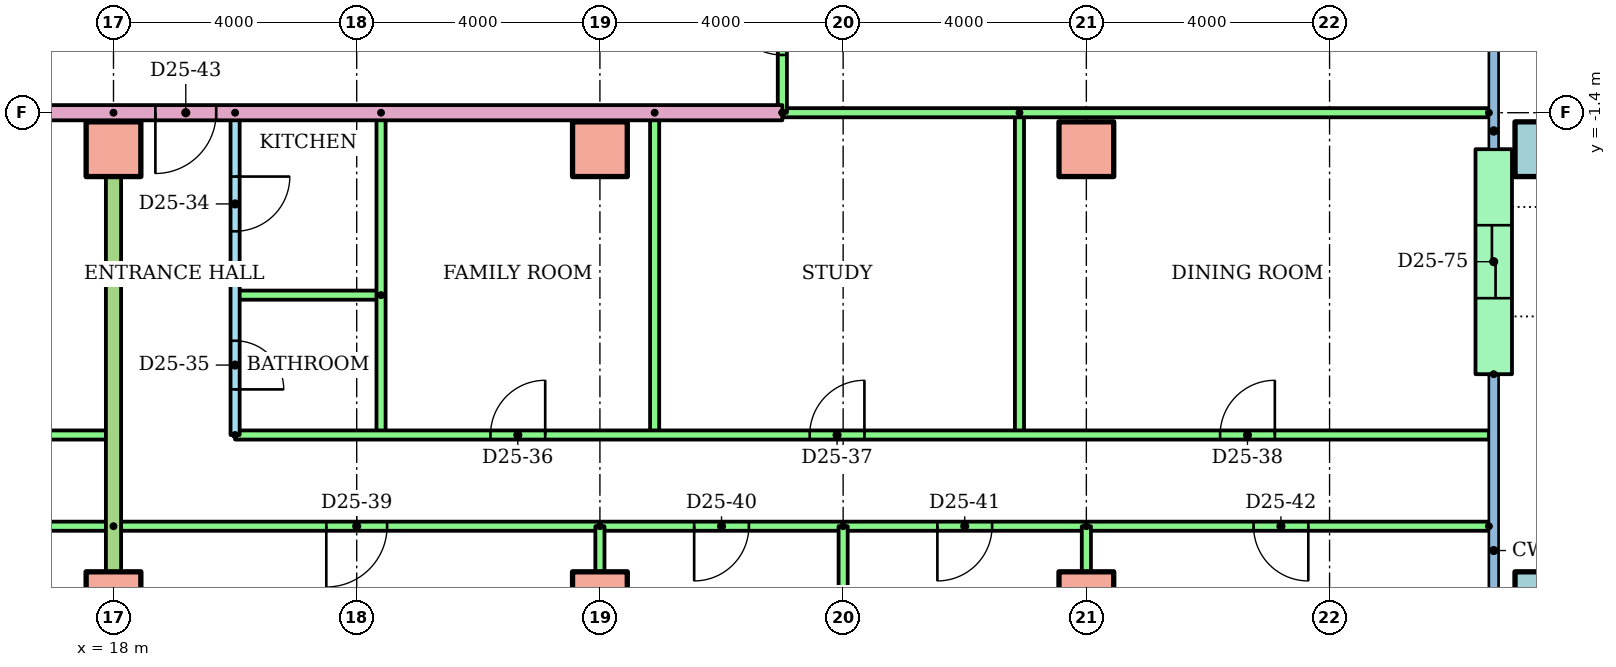
"""IFC4 building model, lengths in metres.
Left out: names, types, materials, properties, quantities, classifications, styles, units other than length and angle.
Written with IfcOpenShell. Run it as: python <this file> out.ifc"""

import sys

from ifc_helpers import new_model, si_unit, direction, frame, frame_2d, origin, origin_2d, place, context, subcontext, project, spatial, rectangle, hollow_rectangle, extrude, element, fill, save


model = new_model("IFC4")
c1 = context("Model", 3, precision=1e-05, world=origin(), true_north=direction((0.0, 1.0)))
c2 = subcontext(c1, "Body", "Model", "MODEL_VIEW")
j1 = project(units=[si_unit("LENGTHUNIT", "METRE"), si_unit("PLANEANGLEUNIT", "RADIAN")], contexts=[c1])
p1 = place(None, origin())
s1 = spatial("IfcSite", under=j1, at=p1, CompositionType="ELEMENT")
p2 = place(p1, origin())
s2 = spatial("IfcBuilding", under=s1, at=p2, CompositionType="ELEMENT")
p3 = place(p2, frame((0.0, 0.0, 96.7)))
s3 = spatial("IfcBuildingStorey", under=s2, at=p3, CompositionType="ELEMENT", Elevation=96.7)
for number, where in (
    (1, (18.0, -9.4, 0.0)),
    (2, (26.0, -9.4, 0.0)),
    (3, (34.0, -9.4, 0.0)),
):
    element("IfcColumn", number, at=place(p3, frame(where)), inside=s3, PredefinedType="COLUMN", context=c2, shape_type="SweptSolid", body=[
        extrude(rectangle(XDim=0.9, YDim=0.9, at=origin_2d()), origin(), (0.0, 0.0, 1.0), 3.2),
    ])
p4 = place(p3, frame((41.5, -9.4, 0.0)))
e4 = element("IfcColumn", 4, at=p4, inside=s3, PredefinedType="COLUMN", context=c2, shape_type="SweptSolid", body=[
    extrude(hollow_rectangle(XDim=0.9, YDim=0.9, WallThickness=0.045, at=origin_2d()), origin(), (0.0, 0.0, 1.0), 3.2),
])
for number, where in (
    (5, (18.0, -2.0, 0.0)),
    (6, (26.0, -2.0, 0.0)),
    (7, (34.0, -2.0, 0.0)),
):
    element("IfcColumn", number, at=place(p3, frame(where)), inside=s3, PredefinedType="COLUMN", context=c2, shape_type="SweptSolid", body=[
        extrude(rectangle(XDim=0.9, YDim=0.9, at=origin_2d()), origin(), (0.0, 0.0, 1.0), 3.2),
    ])
p5 = place(p3, frame((41.5, -2.0, 0.0)))
e8 = element("IfcColumn", 8, at=p5, inside=s3, PredefinedType="COLUMN", context=c2, shape_type="SweptSolid", body=[
    extrude(hollow_rectangle(XDim=0.9, YDim=0.9, WallThickness=0.045, at=origin_2d()), origin(), (0.0, 0.0, 1.0), 3.2),
])
p6 = place(p3, frame((40.7, -5.7, 0.0), z_axis=(0.0, 0.0, 1.0), x_axis=(0.0, 1.0, 0.0)))
e9 = element("IfcWall", 9, at=p6, inside=s3, PredefinedType="STANDARD", context=c2, shape_type="SweptSolid", body=[
    extrude(rectangle(XDim=3.7, YDim=0.6, at=frame_2d((1.85, 0.0))), origin(), (0.0, 0.0, 1.0), 2.92),
])
p7 = place(p6, frame((1.25, 0.0, 0.0)))
e10 = element("IfcOpeningElement", 10, at=p7, cuts=e9, PredefinedType="OPENING", context=c2, shape_type="SweptSolid", body=[
    extrude(rectangle(XDim=1.2, YDim=2.1, at=frame_2d((0.6, 1.05))), frame((0.0, 0.31, 0.0), z_axis=(0.0, -1.0, 0.0), x_axis=(1.0, 0.0, 0.0)), (0.0, 0.0, 1.0), 0.62),
])
p8 = place(p3, frame((-4.0, -6.7, 0.0)))
e11 = element("IfcWall", 11, at=p8, inside=s3, PredefinedType="PARTITIONING", context=c2, shape_type="SweptSolid", body=[
    extrude(rectangle(XDim=22.0, YDim=0.15, at=frame_2d((11.0, 0.0))), origin(), (0.0, 0.0, 1.0), 2.4),
])
p9 = place(p8, frame((6.075, 0.0, 0.0)))
e12 = element("IfcOpeningElement", 12, at=p9, cuts=e11, PredefinedType="OPENING", context=c2, shape_type="SweptSolid", body=[
    extrude(rectangle(XDim=0.9, YDim=2.1, at=frame_2d((0.45, 1.05))), frame((0.0, 0.085, 0.0), z_axis=(0.0, -1.0, 0.0), x_axis=(1.0, 0.0, 0.0)), (0.0, 0.0, 1.0), 0.17),
])
p10 = place(p8, frame((13.45, 0.0, 0.0)))
e13 = element("IfcOpeningElement", 13, at=p10, cuts=e11, PredefinedType="OPENING", context=c2, shape_type="SweptSolid", body=[
    extrude(rectangle(XDim=0.9, YDim=2.1, at=frame_2d((0.45, 1.05))), frame((0.0, 0.085, 0.0), z_axis=(0.0, -1.0, 0.0), x_axis=(1.0, 0.0, 0.0)), (0.0, 0.0, 1.0), 0.17),
])
p11 = place(p8, frame((19.125, 0.0, 0.0)))
e14 = element("IfcOpeningElement", 14, at=p11, cuts=e11, PredefinedType="OPENING", context=c2, shape_type="SweptSolid", body=[
    extrude(rectangle(XDim=0.9, YDim=2.1, at=frame_2d((0.45, 1.05))), frame((0.0, 0.085, 0.0), z_axis=(0.0, -1.0, 0.0), x_axis=(1.0, 0.0, 0.0)), (0.0, 0.0, 1.0), 0.17),
])
p12 = place(p3, frame((18.0, -8.2, 0.0), z_axis=(0.0, 0.0, 1.0), x_axis=(-1.0, 0.0, 0.0)))
e15 = element("IfcWall", 15, at=p12, inside=s3, PredefinedType="PARTITIONING", context=c2, shape_type="SweptSolid", body=[
    extrude(rectangle(XDim=24.0, YDim=0.15, at=frame_2d((12.0, 0.0))), origin(), (0.0, 0.0, 1.0), 2.4),
])
p13 = place(p12, frame((19.5, 0.0, 0.0)))
e16 = element("IfcOpeningElement", 16, at=p13, cuts=e15, PredefinedType="OPENING", context=c2, shape_type="SweptSolid", body=[
    extrude(rectangle(XDim=1.0, YDim=2.1, at=frame_2d((0.5, 1.05))), frame((0.0, 0.085, 0.0), z_axis=(0.0, -1.0, 0.0), x_axis=(1.0, 0.0, 0.0)), (0.0, 0.0, 1.0), 0.17),
])
p14 = place(p12, frame((13.55, 0.0, 0.0)))
e17 = element("IfcOpeningElement", 17, at=p14, cuts=e15, PredefinedType="OPENING", context=c2, shape_type="SweptSolid", body=[
    extrude(rectangle(XDim=0.9, YDim=2.1, at=frame_2d((0.45, 1.05))), frame((0.0, 0.085, 0.0), z_axis=(0.0, -1.0, 0.0), x_axis=(1.0, 0.0, 0.0)), (0.0, 0.0, 1.0), 0.17),
])
p15 = place(p12, frame((9.55, 0.0, 0.0)))
e18 = element("IfcOpeningElement", 18, at=p15, cuts=e15, PredefinedType="OPENING", context=c2, shape_type="SweptSolid", body=[
    extrude(rectangle(XDim=0.9, YDim=2.1, at=frame_2d((0.45, 1.05))), frame((0.0, 0.085, 0.0), z_axis=(0.0, -1.0, 0.0), x_axis=(1.0, 0.0, 0.0)), (0.0, 0.0, 1.0), 0.17),
])
p16 = place(p12, frame((5.55, 0.0, 0.0)))
e19 = element("IfcOpeningElement", 19, at=p16, cuts=e15, PredefinedType="OPENING", context=c2, shape_type="SweptSolid", body=[
    extrude(rectangle(XDim=0.9, YDim=2.1, at=frame_2d((0.45, 1.05))), frame((0.0, 0.085, 0.0), z_axis=(0.0, -1.0, 0.0), x_axis=(1.0, 0.0, 0.0)), (0.0, 0.0, 1.0), 0.17),
])
p17 = place(p12, frame((1.55, 0.0, 0.0)))
e20 = element("IfcOpeningElement", 20, at=p17, cuts=e15, PredefinedType="OPENING", context=c2, shape_type="SweptSolid", body=[
    extrude(rectangle(XDim=0.9, YDim=2.1, at=frame_2d((0.45, 1.05))), frame((0.0, 0.085, 0.0), z_axis=(0.0, -1.0, 0.0), x_axis=(1.0, 0.0, 0.0)), (0.0, 0.0, 1.0), 0.17),
])
p18 = place(p3, frame((20.0, -1.4, 0.0), z_axis=(0.0, 0.0, 1.0), x_axis=(0.0, -1.0, 0.0)))
e21 = element("IfcWall", 21, at=p18, inside=s3, PredefinedType="PARTITIONING", context=c2, shape_type="SweptSolid", body=[
    extrude(rectangle(XDim=5.3, YDim=0.15, at=frame_2d((2.65, 0.0))), origin(), (0.0, 0.0, 1.0), 2.4),
])
p19 = place(p18, frame((1.05, 0.0, 0.0)))
e22 = element("IfcOpeningElement", 22, at=p19, cuts=e21, PredefinedType="OPENING", context=c2, shape_type="SweptSolid", body=[
    extrude(rectangle(XDim=0.9, YDim=2.1, at=frame_2d((0.45, 1.05))), frame((0.0, 0.085, 0.0), z_axis=(0.0, -1.0, 0.0), x_axis=(1.0, 0.0, 0.0)), (0.0, 0.0, 1.0), 0.17),
])
p20 = place(p18, frame((3.75, 0.0, 0.0)))
e23 = element("IfcOpeningElement", 23, at=p20, cuts=e21, PredefinedType="OPENING", context=c2, shape_type="SweptSolid", body=[
    extrude(rectangle(XDim=0.8, YDim=2.1, at=frame_2d((0.4, 1.05))), frame((0.0, 0.085, 0.0), z_axis=(0.0, -1.0, 0.0), x_axis=(1.0, 0.0, 0.0)), (0.0, 0.0, 1.0), 0.17),
])
p21 = place(p3, frame((22.4, -4.4, 0.0), z_axis=(0.0, 0.0, 1.0), x_axis=(-1.0, 0.0, 0.0)))
e24 = element("IfcWall", 24, at=p21, inside=s3, PredefinedType="PARTITIONING", context=c2, shape_type="SweptSolid", body=[
    extrude(rectangle(XDim=2.4, YDim=0.15, at=frame_2d((1.2, 0.0))), origin(), (0.0, 0.0, 1.0), 2.4),
])
for number, where, z_axis, x_axis in (
    (25, (22.4, -1.4, 0.0), (0.0, 0.0, 1.0), (0.0, -1.0, 0.0)),
    (26, (26.9, -1.4, 0.0), (0.0, 0.0, 1.0), (0.0, -1.0, 0.0)),
    (27, (32.9, -1.4, 0.0), (0.0, 0.0, 1.0), (0.0, -1.0, 0.0)),
):
    element("IfcWall", number, at=place(p3, frame(where, z_axis=z_axis, x_axis=x_axis)), inside=s3, PredefinedType="PARTITIONING", context=c2, shape_type="SweptSolid", body=[
        extrude(rectangle(XDim=5.3, YDim=0.15, at=frame_2d((2.65, 0.0))), origin(), (0.0, 0.0, 1.0), 2.4),
    ])
p22 = place(p3, frame((20.0, -6.7, 0.0)))
e28 = element("IfcWall", 28, at=p22, inside=s3, PredefinedType="PARTITIONING", context=c2, shape_type="SweptSolid", body=[
    extrude(rectangle(XDim=20.62, YDim=0.15, at=frame_2d((10.31, 0.0))), origin(), (0.0, 0.0, 1.0), 2.4),
])
p23 = place(p22, frame((4.2, 0.0, 0.0)))
e29 = element("IfcOpeningElement", 29, at=p23, cuts=e28, PredefinedType="OPENING", context=c2, shape_type="SweptSolid", body=[
    extrude(rectangle(XDim=0.9, YDim=2.1, at=frame_2d((0.45, 1.05))), frame((0.0, 0.085, 0.0), z_axis=(0.0, -1.0, 0.0), x_axis=(1.0, 0.0, 0.0)), (0.0, 0.0, 1.0), 0.17),
])
p24 = place(p22, frame((9.45, 0.0, 0.0)))
e30 = element("IfcOpeningElement", 30, at=p24, cuts=e28, PredefinedType="OPENING", context=c2, shape_type="SweptSolid", body=[
    extrude(rectangle(XDim=0.9, YDim=2.1, at=frame_2d((0.45, 1.05))), frame((0.0, 0.085, 0.0), z_axis=(0.0, -1.0, 0.0), x_axis=(1.0, 0.0, 0.0)), (0.0, 0.0, 1.0), 0.17),
])
p25 = place(p22, frame((16.2, 0.0, 0.0)))
e31 = element("IfcOpeningElement", 31, at=p25, cuts=e28, PredefinedType="OPENING", context=c2, shape_type="SweptSolid", body=[
    extrude(rectangle(XDim=0.9, YDim=2.1, at=frame_2d((0.45, 1.05))), frame((0.0, 0.085, 0.0), z_axis=(0.0, -1.0, 0.0), x_axis=(1.0, 0.0, 0.0)), (0.0, 0.0, 1.0), 0.17),
])
p26 = place(p3, frame((40.62, -8.2, 0.0), z_axis=(0.0, 0.0, 1.0), x_axis=(-1.0, 0.0, 0.0)))
e32 = element("IfcWall", 32, at=p26, inside=s3, PredefinedType="PARTITIONING", context=c2, shape_type="SweptSolid", body=[
    extrude(rectangle(XDim=22.62, YDim=0.15, at=frame_2d((11.31, 0.0))), origin(), (0.0, 0.0, 1.0), 2.4),
])
p27 = place(p26, frame((18.12, 0.0, 0.0)))
e33 = element("IfcOpeningElement", 33, at=p27, cuts=e32, PredefinedType="OPENING", context=c2, shape_type="SweptSolid", body=[
    extrude(rectangle(XDim=1.0, YDim=2.1, at=frame_2d((0.5, 1.05))), frame((0.0, 0.085, 0.0), z_axis=(0.0, -1.0, 0.0), x_axis=(1.0, 0.0, 0.0)), (0.0, 0.0, 1.0), 0.17),
])
p28 = place(p26, frame((12.17, 0.0, 0.0)))
e34 = element("IfcOpeningElement", 34, at=p28, cuts=e32, PredefinedType="OPENING", context=c2, shape_type="SweptSolid", body=[
    extrude(rectangle(XDim=0.9, YDim=2.1, at=frame_2d((0.45, 1.05))), frame((0.0, 0.085, 0.0), z_axis=(0.0, -1.0, 0.0), x_axis=(1.0, 0.0, 0.0)), (0.0, 0.0, 1.0), 0.17),
])
p29 = place(p26, frame((8.17, 0.0, 0.0)))
e35 = element("IfcOpeningElement", 35, at=p29, cuts=e32, PredefinedType="OPENING", context=c2, shape_type="SweptSolid", body=[
    extrude(rectangle(XDim=0.9, YDim=2.1, at=frame_2d((0.45, 1.05))), frame((0.0, 0.085, 0.0), z_axis=(0.0, -1.0, 0.0), x_axis=(1.0, 0.0, 0.0)), (0.0, 0.0, 1.0), 0.17),
])
p30 = place(p26, frame((2.97, 0.0, 0.0)))
e36 = element("IfcOpeningElement", 36, at=p30, cuts=e32, PredefinedType="OPENING", context=c2, shape_type="SweptSolid", body=[
    extrude(rectangle(XDim=0.9, YDim=2.1, at=frame_2d((0.45, 1.05))), frame((0.0, 0.085, 0.0), z_axis=(0.0, -1.0, 0.0), x_axis=(1.0, 0.0, 0.0)), (0.0, 0.0, 1.0), 0.17),
])
p31 = place(p3, frame((26.0, -8.2, 0.0), z_axis=(0.0, 0.0, 1.0), x_axis=(0.0, -1.0, 0.0)))
e37 = element("IfcWall", 37, at=p31, inside=s3, PredefinedType="PARTITIONING", context=c2, shape_type="SweptSolid", body=[
    extrude(rectangle(XDim=8.01, YDim=0.15, at=frame_2d((4.005, 0.0))), origin(), (0.0, 0.0, 1.0), 2.4),
])
p32 = place(p3, frame((30.0, -8.2, 0.0), z_axis=(0.0, 0.0, 1.0), x_axis=(0.0, -1.0, 0.0)))
e38 = element("IfcWall", 38, at=p32, inside=s3, PredefinedType="PARTITIONING", context=c2, shape_type="SweptSolid", body=[
    extrude(rectangle(XDim=8.021, YDim=0.15, at=frame_2d((4.01, 0.0))), origin(), (0.0, 0.0, 1.0), 2.4),
])
p33 = place(p3, frame((34.0, -8.2, 0.0), z_axis=(0.0, 0.0, 1.0), x_axis=(0.0, -1.0, 0.0)))
e39 = element("IfcWall", 39, at=p33, inside=s3, PredefinedType="PARTITIONING", context=c2, shape_type="SweptSolid", body=[
    extrude(rectangle(XDim=8.01, YDim=0.15, at=frame_2d((4.005, 0.0))), origin(), (0.0, 0.0, 1.0), 2.4),
])
p34 = place(p3, frame((18.0, -1.4, 0.0), z_axis=(0.0, 0.0, 1.0), x_axis=(0.0, -1.0, 0.0)))
e40 = element("IfcWall", 40, at=p34, inside=s3, PredefinedType="PARTITIONING", context=c2, shape_type="SweptSolid", body=[
    extrude(rectangle(XDim=14.81, YDim=0.25, at=frame_2d((7.405, 0.0))), origin(), (0.0, 0.0, 1.0), 2.4),
])
p35 = place(p3, frame((29.0, -1.4, 0.0), z_axis=(0.0, 0.0, 1.0), x_axis=(-1.0, 0.0, 0.0)))
e41 = element("IfcWall", 41, at=p35, inside=s3, PredefinedType="PARTITIONING", context=c2, shape_type="SweptSolid", body=[
    extrude(rectangle(XDim=15.0, YDim=0.25, at=frame_2d((7.5, 0.0))), origin(), (0.0, 0.0, 1.0), 2.4),
])
p36 = place(p35, frame((9.311, 0.0, 0.0)))
e42 = element("IfcOpeningElement", 42, at=p36, cuts=e41, PredefinedType="OPENING", context=c2, shape_type="SweptSolid", body=[
    extrude(rectangle(XDim=1.0, YDim=2.1, at=frame_2d((0.5, 1.05))), frame((0.0, 0.135, 0.0), z_axis=(0.0, -1.0, 0.0), x_axis=(1.0, 0.0, 0.0)), (0.0, 0.0, 1.0), 0.27),
])
p37 = place(p3, frame((40.62, -1.4, 0.0), z_axis=(0.0, 0.0, 1.0), x_axis=(-1.0, 0.0, 0.0)))
e43 = element("IfcWall", 43, at=p37, inside=s3, PredefinedType="PARTITIONING", context=c2, shape_type="SweptSolid", body=[
    extrude(rectangle(XDim=11.62, YDim=0.15, at=frame_2d((5.81, 0.0))), origin(), (0.0, 0.0, 1.0), 2.4),
])
p38 = place(p3, frame((29.0, -1.4, 0.0), z_axis=(0.0, 0.0, 1.0), x_axis=(0.0, 1.0, 0.0)))
e44 = element("IfcWall", 44, at=p38, inside=s3, PredefinedType="PARTITIONING", context=c2, shape_type="SweptSolid", body=[
    extrude(rectangle(XDim=2.8, YDim=0.15, at=frame_2d((1.4, 0.0))), origin(), (0.0, 0.0, 1.0), 2.4),
])
p39 = place(p38, frame((0.95, 0.0, 0.0)))
e45 = element("IfcOpeningElement", 45, at=p39, cuts=e44, PredefinedType="OPENING", context=c2, shape_type="SweptSolid", body=[
    extrude(rectangle(XDim=0.9, YDim=2.1, at=frame_2d((0.45, 1.05))), frame((0.0, 0.085, 0.0), z_axis=(0.0, -1.0, 0.0), x_axis=(1.0, 0.0, 0.0)), (0.0, 0.0, 1.0), 0.17),
])
p40 = place(p19, origin())
e46 = element("IfcDoor", 46, at=p40, inside=s3, OperationType="SINGLE_SWING_LEFT", PredefinedType="DOOR", context=c2, shape_type="SweptSolid", body=[
    extrude(rectangle(XDim=0.9, YDim=2.1, at=frame_2d((0.45, 1.05))), frame((0.0, 0.025, 0.0), z_axis=(0.0, -1.0, 0.0), x_axis=(1.0, 0.0, 0.0)), (0.0, 0.0, 1.0), 0.05),
])
fill(e22, e46)
p41 = place(p20, origin())
e47 = element("IfcDoor", 47, at=p41, inside=s3, OperationType="SINGLE_SWING_RIGHT", PredefinedType="DOOR", context=c2, shape_type="SweptSolid", body=[
    extrude(rectangle(XDim=0.8, YDim=2.1, at=frame_2d((0.4, 1.05))), frame((0.0, 0.025, 0.0), z_axis=(0.0, -1.0, 0.0), x_axis=(1.0, 0.0, 0.0)), (0.0, 0.0, 1.0), 0.05),
])
fill(e23, e47)
p42 = place(p23, origin())
e48 = element("IfcDoor", 48, at=p42, inside=s3, OperationType="SINGLE_SWING_RIGHT", PredefinedType="DOOR", context=c2, shape_type="SweptSolid", body=[
    extrude(rectangle(XDim=0.9, YDim=2.1, at=frame_2d((0.45, 1.05))), frame((0.0, 0.025, 0.0), z_axis=(0.0, -1.0, 0.0), x_axis=(1.0, 0.0, 0.0)), (0.0, 0.0, 1.0), 0.05),
])
fill(e29, e48)
p43 = place(p24, origin())
e49 = element("IfcDoor", 49, at=p43, inside=s3, OperationType="SINGLE_SWING_RIGHT", PredefinedType="DOOR", context=c2, shape_type="SweptSolid", body=[
    extrude(rectangle(XDim=0.9, YDim=2.1, at=frame_2d((0.45, 1.05))), frame((0.0, 0.025, 0.0), z_axis=(0.0, -1.0, 0.0), x_axis=(1.0, 0.0, 0.0)), (0.0, 0.0, 1.0), 0.05),
])
fill(e30, e49)
p44 = place(p25, origin())
e50 = element("IfcDoor", 50, at=p44, inside=s3, OperationType="SINGLE_SWING_RIGHT", PredefinedType="DOOR", context=c2, shape_type="SweptSolid", body=[
    extrude(rectangle(XDim=0.9, YDim=2.1, at=frame_2d((0.45, 1.05))), frame((0.0, 0.025, 0.0), z_axis=(0.0, -1.0, 0.0), x_axis=(1.0, 0.0, 0.0)), (0.0, 0.0, 1.0), 0.05),
])
fill(e31, e50)
p45 = place(p27, origin())
e51 = element("IfcDoor", 51, at=p45, inside=s3, OperationType="SINGLE_SWING_RIGHT", PredefinedType="DOOR", context=c2, shape_type="SweptSolid", body=[
    extrude(rectangle(XDim=1.0, YDim=2.1, at=frame_2d((0.5, 1.05))), frame((0.0, 0.025, 0.0), z_axis=(0.0, -1.0, 0.0), x_axis=(1.0, 0.0, 0.0)), (0.0, 0.0, 1.0), 0.05),
])
fill(e33, e51)
p46 = place(p28, origin())
e52 = element("IfcDoor", 52, at=p46, inside=s3, OperationType="SINGLE_SWING_RIGHT", PredefinedType="DOOR", context=c2, shape_type="SweptSolid", body=[
    extrude(rectangle(XDim=0.9, YDim=2.1, at=frame_2d((0.45, 1.05))), frame((0.0, 0.025, 0.0), z_axis=(0.0, -1.0, 0.0), x_axis=(1.0, 0.0, 0.0)), (0.0, 0.0, 1.0), 0.05),
])
fill(e34, e52)
p47 = place(p29, origin())
e53 = element("IfcDoor", 53, at=p47, inside=s3, OperationType="SINGLE_SWING_RIGHT", PredefinedType="DOOR", context=c2, shape_type="SweptSolid", body=[
    extrude(rectangle(XDim=0.9, YDim=2.1, at=frame_2d((0.45, 1.05))), frame((0.0, 0.025, 0.0), z_axis=(0.0, -1.0, 0.0), x_axis=(1.0, 0.0, 0.0)), (0.0, 0.0, 1.0), 0.05),
])
fill(e35, e53)
p48 = place(p30, origin())
e54 = element("IfcDoor", 54, at=p48, inside=s3, OperationType="SINGLE_SWING_LEFT", PredefinedType="DOOR", context=c2, shape_type="SweptSolid", body=[
    extrude(rectangle(XDim=0.9, YDim=2.1, at=frame_2d((0.45, 1.05))), frame((0.0, 0.025, 0.0), z_axis=(0.0, -1.0, 0.0), x_axis=(1.0, 0.0, 0.0)), (0.0, 0.0, 1.0), 0.05),
])
fill(e36, e54)
p49 = place(p36, origin())
e55 = element("IfcDoor", 55, at=p49, inside=s3, OperationType="SINGLE_SWING_RIGHT", PredefinedType="DOOR", context=c2, shape_type="SweptSolid", body=[
    extrude(rectangle(XDim=1.0, YDim=2.1, at=frame_2d((0.5, 1.05))), frame((0.0, 0.025, 0.0), z_axis=(0.0, -1.0, 0.0), x_axis=(1.0, 0.0, 0.0)), (0.0, 0.0, 1.0), 0.05),
])
fill(e42, e55)
p50 = place(p39, origin())
e56 = element("IfcDoor", 56, at=p50, inside=s3, OperationType="SINGLE_SWING_RIGHT", PredefinedType="DOOR", context=c2, shape_type="SweptSolid", body=[
    extrude(rectangle(XDim=0.9, YDim=2.1, at=frame_2d((0.45, 1.05))), frame((0.0, 0.025, 0.0), z_axis=(0.0, -1.0, 0.0), x_axis=(1.0, 0.0, 0.0)), (0.0, 0.0, 1.0), 0.05),
])
fill(e45, e56)
p51 = place(p7, origin())
e57 = element("IfcDoor", 57, at=p51, inside=s3, OperationType="SLIDING_TO_LEFT", PredefinedType="DOOR", context=c2, shape_type="SweptSolid", body=[
    extrude(rectangle(XDim=1.2, YDim=2.1, at=frame_2d((0.6, 1.05))), frame((0.0, 0.025, 0.0), z_axis=(0.0, -1.0, 0.0), x_axis=(1.0, 0.0, 0.0)), (0.0, 0.0, 1.0), 0.05),
])
fill(e10, e57)
save(model, sys.argv[1])
